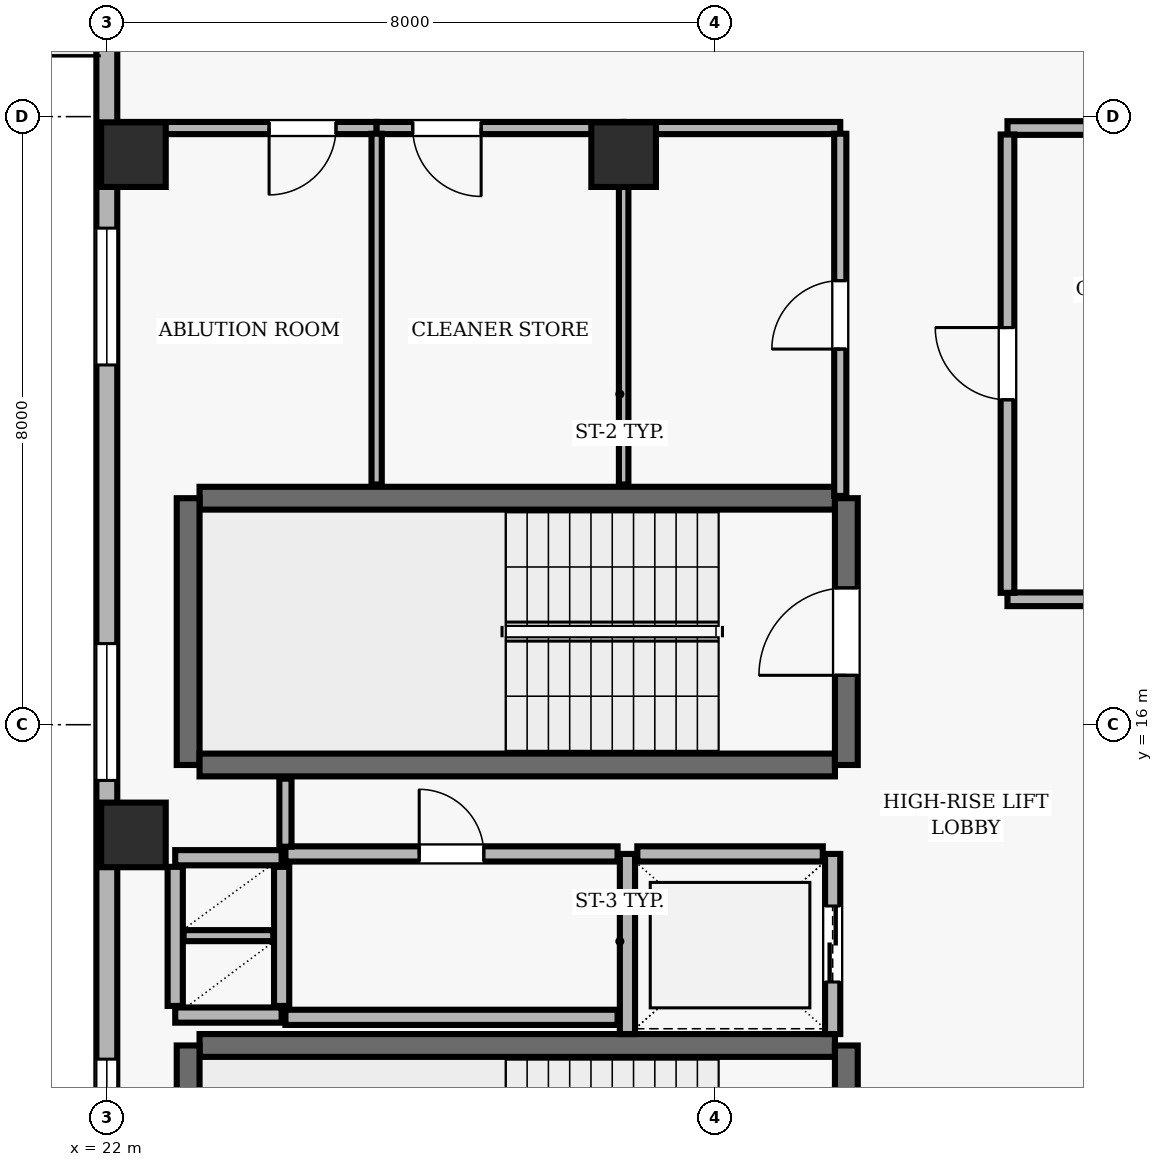
"""IFC4 building model, lengths in metres.
Left out: names, types, materials, properties, quantities, classifications, styles, units other than length and angle.
Written with IfcOpenShell. Run it as: python <this file> out.ifc"""

import sys

from ifc_helpers import new_model, si_unit, direction, frame, frame_2d, origin, origin_2d, place, context, subcontext, project, spatial, rectangle, extrude, element, fill, save


model = new_model("IFC4")
c1 = context("Model", 3, precision=1e-05, world=origin(), true_north=direction((0.0, 1.0)))
c2 = subcontext(c1, "Body", "Model", "MODEL_VIEW")
j1 = project(units=[si_unit("LENGTHUNIT", "METRE"), si_unit("PLANEANGLEUNIT", "RADIAN")], contexts=[c1])
p1 = place(None, origin())
s1 = spatial("IfcSite", under=j1, at=p1, CompositionType="ELEMENT")
p2 = place(p1, origin())
s2 = spatial("IfcBuilding", under=s1, at=p2, CompositionType="ELEMENT")
p3 = place(p2, frame((0.0, 0.0, 302.8)))
s3 = spatial("IfcBuildingStorey", under=s2, at=p3, CompositionType="ELEMENT", Elevation=302.8)
for number, where, z_axis, x_axis in (
    (1, (22.35, 14.55, 0.0), (0.0, 0.0, 1.0), (1.0, 0.0, 0.0)),
    (2, (22.35, 23.5, 0.0), (0.0, 0.0, 1.0), (1.0, 0.0, 0.0)),
    (3, (28.8, 23.5, 0.0), (0.0, 0.0, 1.0), (1.0, 0.0, 0.0)),
):
    element("IfcColumn", number, at=place(p3, frame(where, z_axis=z_axis, x_axis=x_axis)), inside=s3, PredefinedType="COLUMN", context=c2, shape_type="SweptSolid", body=[
        extrude(rectangle(XDim=0.85, YDim=0.85, at=origin_2d()), origin(), (0.0, 0.0, 1.0), 3.9),
    ])
p4 = place(p3, frame((22.0, 35.3, 0.0), z_axis=(0.0, 0.0, 1.0), x_axis=(0.0, -1.0, 0.0)))
e4 = element("IfcWall", 4, at=p4, inside=s3, PredefinedType="SOLIDWALL", context=c2, shape_type="SweptSolid", body=[
    extrude(rectangle(XDim=32.8, YDim=0.275, at=frame_2d((16.4, 0.0))), origin(), (0.0, 0.0, 1.0), 3.64),
])
p5 = place(p4, frame((7.3, 0.0, 0.0)))
e5 = element("IfcOpeningElement", 5, at=p5, cuts=e4, PredefinedType="OPENING", context=c2, shape_type="SweptSolid", body=[
    extrude(rectangle(XDim=1.0, YDim=2.2, at=frame_2d((0.5, 1.1))), frame((0.0, 0.147, 0.0), z_axis=(0.0, -1.0, 0.0), x_axis=(1.0, 0.0, 0.0)), (0.0, 0.0, 1.0), 0.295),
])
p6 = place(p4, frame((2.283, 0.0, 0.9)))
e6 = element("IfcOpeningElement", 6, at=p6, cuts=e4, PredefinedType="OPENING", context=c2, shape_type="SweptSolid", body=[
    extrude(rectangle(XDim=1.8, YDim=1.6, at=frame_2d((0.9, 0.8))), frame((0.0, 0.147, 0.0), z_axis=(0.0, -1.0, 0.0), x_axis=(1.0, 0.0, 0.0)), (0.0, 0.0, 1.0), 0.295),
])
p7 = place(p4, frame((12.767, 0.0, 0.9)))
e7 = element("IfcOpeningElement", 7, at=p7, cuts=e4, PredefinedType="OPENING", context=c2, shape_type="SweptSolid", body=[
    extrude(rectangle(XDim=1.8, YDim=1.6, at=frame_2d((0.9, 0.8))), frame((0.0, 0.147, 0.0), z_axis=(0.0, -1.0, 0.0), x_axis=(1.0, 0.0, 0.0)), (0.0, 0.0, 1.0), 0.295),
])
p8 = place(p4, frame((18.233, 0.0, 0.9)))
e8 = element("IfcOpeningElement", 8, at=p8, cuts=e4, PredefinedType="OPENING", context=c2, shape_type="SweptSolid", body=[
    extrude(rectangle(XDim=1.8, YDim=1.6, at=frame_2d((0.9, 0.8))), frame((0.0, 0.147, 0.0), z_axis=(0.0, -1.0, 0.0), x_axis=(1.0, 0.0, 0.0)), (0.0, 0.0, 1.0), 0.295),
])
p9 = place(p4, frame((23.7, 0.0, 0.9)))
e9 = element("IfcOpeningElement", 9, at=p9, cuts=e4, PredefinedType="OPENING", context=c2, shape_type="SweptSolid", body=[
    extrude(rectangle(XDim=1.8, YDim=1.6, at=frame_2d((0.9, 0.8))), frame((0.0, 0.147, 0.0), z_axis=(0.0, -1.0, 0.0), x_axis=(1.0, 0.0, 0.0)), (0.0, 0.0, 1.0), 0.295),
])
p10 = place(p3, frame((31.58, 18.98, 0.0), z_axis=(0.0, 0.0, 1.0), x_axis=(-1.0, 0.0, 0.0)))
e10 = element("IfcWall", 10, at=p10, inside=s3, PredefinedType="SHEAR", context=c2, shape_type="SweptSolid", body=[
    extrude(rectangle(XDim=8.36, YDim=0.3, at=frame_2d((4.18, 0.0))), origin(), (0.0, 0.0, 1.0), 3.64),
])
p11 = place(p3, frame((23.07, 18.98, 0.0), z_axis=(0.0, 0.0, 1.0), x_axis=(0.0, -1.0, 0.0)))
e11 = element("IfcWall", 11, at=p11, inside=s3, PredefinedType="SHEAR", context=c2, shape_type="SweptSolid", body=[
    extrude(rectangle(XDim=3.51, YDim=0.3, at=frame_2d((1.755, 0.0))), origin(), (0.0, 0.0, 1.0), 3.64),
])
p12 = place(p3, frame((23.22, 15.47, 0.0), z_axis=(0.0, 0.0, 1.0), x_axis=(1.0, 0.0, 0.0)))
e12 = element("IfcWall", 12, at=p12, inside=s3, PredefinedType="SHEAR", context=c2, shape_type="SweptSolid", body=[
    extrude(rectangle(XDim=8.36, YDim=0.3, at=frame_2d((4.18, 0.0))), origin(), (0.0, 0.0, 1.0), 3.64),
])
p13 = place(p3, frame((31.73, 15.47, 0.0), z_axis=(0.0, 0.0, 1.0), x_axis=(0.0, 1.0, 0.0)))
e13 = element("IfcWall", 13, at=p13, inside=s3, PredefinedType="SHEAR", context=c2, shape_type="SweptSolid", body=[
    extrude(rectangle(XDim=3.51, YDim=0.3, at=frame_2d((1.755, 0.0))), origin(), (0.0, 0.0, 1.0), 3.64),
])
p14 = place(p13, frame((1.18, 0.0, 0.0)))
e14 = element("IfcOpeningElement", 14, at=p14, cuts=e13, PredefinedType="OPENING", context=c2, shape_type="SweptSolid", body=[
    extrude(rectangle(XDim=1.15, YDim=2.15, at=frame_2d((0.575, 1.075))), frame((0.0, 0.16, 0.0), z_axis=(0.0, -1.0, 0.0), x_axis=(1.0, 0.0, 0.0)), (0.0, 0.0, 1.0), 0.32),
])
p15 = place(p3, frame((31.58, 11.78, 0.0), z_axis=(0.0, 0.0, 1.0), x_axis=(-1.0, 0.0, 0.0)))
e15 = element("IfcWall", 15, at=p15, inside=s3, PredefinedType="SHEAR", context=c2, shape_type="SweptSolid", body=[
    extrude(rectangle(XDim=8.36, YDim=0.3, at=frame_2d((4.18, 0.0))), origin(), (0.0, 0.0, 1.0), 3.64),
])
p16 = place(p3, frame((23.07, 11.78, 0.0), z_axis=(0.0, 0.0, 1.0), x_axis=(0.0, -1.0, 0.0)))
e16 = element("IfcWall", 16, at=p16, inside=s3, PredefinedType="SHEAR", context=c2, shape_type="SweptSolid", body=[
    extrude(rectangle(XDim=3.51, YDim=0.3, at=frame_2d((1.755, 0.0))), origin(), (0.0, 0.0, 1.0), 3.64),
])
p17 = place(p3, frame((31.73, 8.27, 0.0), z_axis=(0.0, 0.0, 1.0), x_axis=(0.0, 1.0, 0.0)))
e17 = element("IfcWall", 17, at=p17, inside=s3, PredefinedType="SHEAR", context=c2, shape_type="SweptSolid", body=[
    extrude(rectangle(XDim=3.51, YDim=0.3, at=frame_2d((1.755, 0.0))), origin(), (0.0, 0.0, 1.0), 3.64),
])
p18 = place(p17, frame((1.18, 0.0, 0.0)))
e18 = element("IfcOpeningElement", 18, at=p18, cuts=e17, PredefinedType="OPENING", context=c2, shape_type="SweptSolid", body=[
    extrude(rectangle(XDim=1.15, YDim=2.15, at=frame_2d((0.575, 1.075))), frame((0.0, 0.16, 0.0), z_axis=(0.0, -1.0, 0.0), x_axis=(1.0, 0.0, 0.0)), (0.0, 0.0, 1.0), 0.32),
])
p19 = place(p3, frame((28.85, 14.3, 0.0), z_axis=(0.0, 0.0, 1.0), x_axis=(0.0, -1.0, 0.0)))
e19 = element("IfcWall", 19, at=p19, inside=s3, PredefinedType="SOLIDWALL", context=c2, shape_type="SweptSolid", body=[
    extrude(rectangle(XDim=2.37, YDim=0.2, at=frame_2d((1.185, 0.0))), origin(), (0.0, 0.0, 1.0), 3.64),
])
p20 = place(p3, frame((31.55, 11.93, 0.0), z_axis=(0.0, 0.0, 1.0), x_axis=(0.0, 1.0, 0.0)))
e20 = element("IfcWall", 20, at=p20, inside=s3, PredefinedType="SOLIDWALL", context=c2, shape_type="SweptSolid", body=[
    extrude(rectangle(XDim=2.37, YDim=0.2, at=frame_2d((1.185, 0.0))), origin(), (0.0, 0.0, 1.0), 3.64),
])
p21 = place(p20, frame((0.685, 0.0, 0.0)))
e21 = element("IfcOpeningElement", 21, at=p21, cuts=e20, PredefinedType="OPENING", context=c2, shape_type="SweptSolid", body=[
    extrude(rectangle(XDim=1.0, YDim=2.1, at=frame_2d((0.5, 1.05))), frame((0.0, 0.11, 0.0), z_axis=(0.0, -1.0, 0.0), x_axis=(1.0, 0.0, 0.0)), (0.0, 0.0, 1.0), 0.22),
])
p22 = place(p3, frame((31.42, 14.3, 0.0), z_axis=(0.0, 0.0, 1.0), x_axis=(-1.0, 0.0, 0.0)))
e22 = element("IfcWall", 22, at=p22, inside=s3, PredefinedType="SOLIDWALL", context=c2, shape_type="SweptSolid", body=[
    extrude(rectangle(XDim=2.44, YDim=0.2, at=frame_2d((1.22, 0.0))), origin(), (0.0, 0.0, 1.0), 3.64),
])
for number, where, z_axis, x_axis in (
    (23, (22.9, 14.25, 0.0), (0.0, 0.0, 1.0), (1.0, 0.0, 0.0)),
    (24, (22.9, 12.18, 0.0), (0.0, 0.0, 1.0), (1.0, 0.0, 0.0)),
):
    element("IfcWall", number, at=place(p3, frame(where, z_axis=z_axis, x_axis=x_axis)), inside=s3, PredefinedType="SOLIDWALL", context=c2, shape_type="SweptSolid", body=[
        extrude(rectangle(XDim=1.4, YDim=0.2, at=frame_2d((0.7, 0.0))), origin(), (0.0, 0.0, 1.0), 3.64),
    ])
for number, where, z_axis, x_axis in (
    (25, (24.3, 12.3, 0.0), (0.0, 0.0, 1.0), (0.0, 1.0, 0.0)),
    (26, (22.9, 12.3, 0.0), (0.0, 0.0, 1.0), (0.0, 1.0, 0.0)),
):
    element("IfcWall", number, at=place(p3, frame(where, z_axis=z_axis, x_axis=x_axis)), inside=s3, PredefinedType="SOLIDWALL", context=c2, shape_type="SweptSolid", body=[
        extrude(rectangle(XDim=1.83, YDim=0.2, at=frame_2d((0.915, 0.0))), origin(), (0.0, 0.0, 1.0), 3.64),
    ])
p23 = place(p3, frame((23.01, 13.225, 0.0), z_axis=(0.0, 0.0, 1.0), x_axis=(1.0, 0.0, 0.0)))
e27 = element("IfcWall", 27, at=p23, inside=s3, PredefinedType="PARTITIONING", context=c2, shape_type="SweptSolid", body=[
    extrude(rectangle(XDim=1.18, YDim=0.145, at=frame_2d((0.59, 0.0))), origin(), (0.0, 0.0, 1.0), 3.64),
])
p24 = place(p3, frame((24.35, 12.15, 0.0), z_axis=(0.0, 0.0, 1.0), x_axis=(1.0, 0.0, 0.0)))
e28 = element("IfcWall", 28, at=p24, inside=s3, PredefinedType="SOLIDWALL", context=c2, shape_type="SweptSolid", body=[
    extrude(rectangle(XDim=4.37, YDim=0.2, at=frame_2d((2.185, 0.0))), origin(), (0.0, 0.0, 1.0), 3.64),
])
p25 = place(p3, frame((24.35, 14.3, 0.0), z_axis=(0.0, 0.0, 1.0), x_axis=(1.0, 0.0, 0.0)))
e29 = element("IfcWall", 29, at=p25, inside=s3, PredefinedType="SOLIDWALL", context=c2, shape_type="SweptSolid", body=[
    extrude(rectangle(XDim=4.37, YDim=0.2, at=frame_2d((2.185, 0.0))), origin(), (0.0, 0.0, 1.0), 3.64),
])
p26 = place(p25, frame((1.76, 0.0, 0.0)))
e30 = element("IfcOpeningElement", 30, at=p26, cuts=e29, PredefinedType="OPENING", context=c2, shape_type="SweptSolid", body=[
    extrude(rectangle(XDim=0.85, YDim=2.1, at=frame_2d((0.425, 1.05))), frame((0.0, 0.11, 0.0), z_axis=(0.0, -1.0, 0.0), x_axis=(1.0, 0.0, 0.0)), (0.0, 0.0, 1.0), 0.22),
])
p27 = place(p3, frame((25.55, 23.85, 0.0), z_axis=(0.0, 0.0, 1.0), x_axis=(-1.0, 0.0, 0.0)))
e31 = element("IfcWall", 31, at=p27, inside=s3, PredefinedType="PARTITIONING", context=c2, shape_type="SweptSolid", body=[
    extrude(rectangle(XDim=3.35, YDim=0.16, at=frame_2d((1.675, 0.0))), origin(), (0.0, 0.0, 1.0), 3.171),
])
p28 = place(p27, frame((0.535, 0.0, 0.0)))
e32 = element("IfcOpeningElement", 32, at=p28, cuts=e31, PredefinedType="OPENING", context=c2, shape_type="SweptSolid", body=[
    extrude(rectangle(XDim=0.88, YDim=2.1, at=frame_2d((0.44, 1.05))), frame((0.0, 0.09, 0.0), z_axis=(0.0, -1.0, 0.0), x_axis=(1.0, 0.0, 0.0)), (0.0, 0.0, 1.0), 0.18),
])
p29 = place(p3, frame((28.8, 23.85, 0.0), z_axis=(0.0, 0.0, 1.0), x_axis=(-1.0, 0.0, 0.0)))
e33 = element("IfcWall", 33, at=p29, inside=s3, PredefinedType="PARTITIONING", context=c2, shape_type="SweptSolid", body=[
    extrude(rectangle(XDim=3.25, YDim=0.16, at=frame_2d((1.625, 0.0))), origin(), (0.0, 0.0, 1.0), 3.171),
])
p30 = place(p29, frame((1.875, 0.0, 0.0)))
e34 = element("IfcOpeningElement", 34, at=p30, cuts=e33, PredefinedType="OPENING", context=c2, shape_type="SweptSolid", body=[
    extrude(rectangle(XDim=0.9, YDim=2.1, at=frame_2d((0.45, 1.05))), frame((0.0, 0.09, 0.0), z_axis=(0.0, -1.0, 0.0), x_axis=(1.0, 0.0, 0.0)), (0.0, 0.0, 1.0), 0.18),
])
p31 = place(p3, frame((31.65, 23.85, 0.0), z_axis=(0.0, 0.0, 1.0), x_axis=(-1.0, 0.0, 0.0)))
e35 = element("IfcWall", 35, at=p31, inside=s3, PredefinedType="PARTITIONING", context=c2, shape_type="SweptSolid", body=[
    extrude(rectangle(XDim=2.85, YDim=0.16, at=frame_2d((1.425, 0.0))), origin(), (0.0, 0.0, 1.0), 3.171),
])
p32 = place(p3, frame((33.85, 17.65, 0.0), z_axis=(0.0, 0.0, 1.0), x_axis=(1.0, 0.0, 0.0)))
e36 = element("IfcWall", 36, at=p32, inside=s3, PredefinedType="PARTITIONING", context=c2, shape_type="SweptSolid", body=[
    extrude(rectangle(XDim=1.3, YDim=0.18, at=frame_2d((0.65, 0.0))), origin(), (0.0, 0.0, 1.0), 3.64),
])
p33 = place(p3, frame((37.85, 23.85, 0.0), z_axis=(0.0, 0.0, 1.0), x_axis=(-1.0, 0.0, 0.0)))
e37 = element("IfcWall", 37, at=p33, inside=s3, PredefinedType="PARTITIONING", context=c2, shape_type="SweptSolid", body=[
    extrude(rectangle(XDim=4.0, YDim=0.18, at=frame_2d((2.0, 0.0))), origin(), (0.0, 0.0, 1.0), 3.171),
])
p34 = place(p3, frame((24.35, 15.29, 0.0), z_axis=(0.0, 0.0, 1.0), x_axis=(0.0, -1.0, 0.0)))
e38 = element("IfcWall", 38, at=p34, inside=s3, PredefinedType="PARTITIONING", context=c2, shape_type="SweptSolid", body=[
    extrude(rectangle(XDim=0.895, YDim=0.16, at=frame_2d((0.448, 0.0))), origin(), (0.0, 0.0, 1.0), 3.64),
])
p35 = place(p3, frame((25.55, 19.16, 0.0), z_axis=(0.0, 0.0, 1.0), x_axis=(0.0, 1.0, 0.0)))
e39 = element("IfcWall", 39, at=p35, inside=s3, PredefinedType="PARTITIONING", context=c2, shape_type="SweptSolid", body=[
    extrude(rectangle(XDim=4.615, YDim=0.135, at=frame_2d((2.308, 0.0))), origin(), (0.0, 0.0, 1.0), 3.64),
])
p36 = place(p3, frame((28.8, 23.775, 0.0), z_axis=(0.0, 0.0, 1.0), x_axis=(0.0, -1.0, 0.0)))
e40 = element("IfcWall", 40, at=p36, inside=s3, PredefinedType="PARTITIONING", context=c2, shape_type="SweptSolid", body=[
    extrude(rectangle(XDim=4.615, YDim=0.125, at=frame_2d((2.308, 0.0))), origin(), (0.0, 0.0, 1.0), 3.64),
])
p37 = place(p3, frame((31.65, 19.01, 0.0), z_axis=(0.0, 0.0, 1.0), x_axis=(0.0, 1.0, 0.0)))
e41 = element("IfcWall", 41, at=p37, inside=s3, PredefinedType="PARTITIONING", context=c2, shape_type="SweptSolid", body=[
    extrude(rectangle(XDim=4.765, YDim=0.16, at=frame_2d((2.382, 0.0))), origin(), (0.0, 0.0, 1.0), 3.64),
])
p38 = place(p37, frame((1.932, 0.0, 0.0)))
e42 = element("IfcOpeningElement", 42, at=p38, cuts=e41, PredefinedType="OPENING", context=c2, shape_type="SweptSolid", body=[
    extrude(rectangle(XDim=0.9, YDim=2.1, at=frame_2d((0.45, 1.05))), frame((0.0, 0.09, 0.0), z_axis=(0.0, -1.0, 0.0), x_axis=(1.0, 0.0, 0.0)), (0.0, 0.0, 1.0), 0.18),
])
p39 = place(p3, frame((33.85, 17.735, 0.0), z_axis=(0.0, 0.0, 1.0), x_axis=(0.0, 1.0, 0.0)))
e43 = element("IfcWall", 43, at=p39, inside=s3, PredefinedType="PARTITIONING", context=c2, shape_type="SweptSolid", body=[
    extrude(rectangle(XDim=6.03, YDim=0.18, at=frame_2d((3.015, 0.0))), origin(), (0.0, 0.0, 1.0), 3.64),
])
p40 = place(p39, frame((2.54, 0.0, 0.0)))
e44 = element("IfcOpeningElement", 44, at=p40, cuts=e43, PredefinedType="OPENING", context=c2, shape_type="SweptSolid", body=[
    extrude(rectangle(XDim=0.95, YDim=2.1, at=frame_2d((0.475, 1.05))), frame((0.0, 0.1, 0.0), z_axis=(0.0, -1.0, 0.0), x_axis=(1.0, 0.0, 0.0)), (0.0, 0.0, 1.0), 0.2),
])
p41 = place(p7, origin())
e45 = element("IfcWindow", 45, at=p41, inside=s3, PartitioningType="SINGLE_PANEL", PredefinedType="WINDOW", context=c2, shape_type="SweptSolid", body=[
    extrude(rectangle(XDim=1.8, YDim=1.6, at=frame_2d((0.9, 0.8))), frame((0.0, 0.03, 0.0), z_axis=(0.0, -1.0, 0.0), x_axis=(1.0, 0.0, 0.0)), (0.0, 0.0, 1.0), 0.06),
])
fill(e7, e45)
p42 = place(p8, origin())
e46 = element("IfcWindow", 46, at=p42, inside=s3, PartitioningType="SINGLE_PANEL", PredefinedType="WINDOW", context=c2, shape_type="SweptSolid", body=[
    extrude(rectangle(XDim=1.8, YDim=1.6, at=frame_2d((0.9, 0.8))), frame((0.0, 0.03, 0.0), z_axis=(0.0, -1.0, 0.0), x_axis=(1.0, 0.0, 0.0)), (0.0, 0.0, 1.0), 0.06),
])
fill(e8, e46)
p43 = place(p9, origin())
e47 = element("IfcWindow", 47, at=p43, inside=s3, PartitioningType="SINGLE_PANEL", PredefinedType="WINDOW", context=c2, shape_type="SweptSolid", body=[
    extrude(rectangle(XDim=1.8, YDim=1.6, at=frame_2d((0.9, 0.8))), frame((0.0, 0.03, 0.0), z_axis=(0.0, -1.0, 0.0), x_axis=(1.0, 0.0, 0.0)), (0.0, 0.0, 1.0), 0.06),
])
fill(e9, e47)
p44 = place(p14, origin())
e48 = element("IfcDoor", 48, at=p44, inside=s3, OperationType="SINGLE_SWING_LEFT", PredefinedType="DOOR", context=c2, shape_type="SweptSolid", body=[
    extrude(rectangle(XDim=1.15, YDim=2.15, at=frame_2d((0.575, 1.075))), frame((0.0, 0.025, 0.0), z_axis=(0.0, -1.0, 0.0), x_axis=(1.0, 0.0, 0.0)), (0.0, 0.0, 1.0), 0.05),
])
fill(e14, e48)
p45 = place(p21, origin())
e49 = element("IfcDoor", 49, at=p45, inside=s3, OperationType="DOUBLE_DOOR_SLIDING", PredefinedType="DOOR", context=c2, shape_type="SweptSolid", body=[
    extrude(rectangle(XDim=1.0, YDim=2.1, at=frame_2d((0.5, 1.05))), frame((0.0, 0.025, 0.0), z_axis=(0.0, -1.0, 0.0), x_axis=(1.0, 0.0, 0.0)), (0.0, 0.0, 1.0), 0.05),
])
fill(e21, e49)
p46 = place(p40, origin())
e50 = element("IfcDoor", 50, at=p46, inside=s3, OperationType="SINGLE_SWING_RIGHT", PredefinedType="DOOR", context=c2, shape_type="SweptSolid", body=[
    extrude(rectangle(XDim=0.95, YDim=2.1, at=frame_2d((0.475, 1.05))), frame((0.0, 0.025, 0.0), z_axis=(0.0, -1.0, 0.0), x_axis=(1.0, 0.0, 0.0)), (0.0, 0.0, 1.0), 0.05),
])
fill(e44, e50)
p47 = place(p38, origin())
e51 = element("IfcDoor", 51, at=p47, inside=s3, OperationType="SINGLE_SWING_LEFT", PredefinedType="DOOR", context=c2, shape_type="SweptSolid", body=[
    extrude(rectangle(XDim=0.9, YDim=2.1, at=frame_2d((0.45, 1.05))), frame((0.0, 0.025, 0.0), z_axis=(0.0, -1.0, 0.0), x_axis=(1.0, 0.0, 0.0)), (0.0, 0.0, 1.0), 0.05),
])
fill(e42, e51)
p48 = place(p26, origin())
e52 = element("IfcDoor", 52, at=p48, inside=s3, OperationType="SINGLE_SWING_LEFT", PredefinedType="DOOR", context=c2, shape_type="SweptSolid", body=[
    extrude(rectangle(XDim=0.85, YDim=2.1, at=frame_2d((0.425, 1.05))), frame((0.0, 0.025, 0.0), z_axis=(0.0, -1.0, 0.0), x_axis=(1.0, 0.0, 0.0)), (0.0, 0.0, 1.0), 0.05),
])
fill(e30, e52)
p49 = place(p28, origin())
e53 = element("IfcDoor", 53, at=p49, inside=s3, OperationType="SINGLE_SWING_RIGHT", PredefinedType="DOOR", context=c2, shape_type="SweptSolid", body=[
    extrude(rectangle(XDim=0.88, YDim=2.1, at=frame_2d((0.44, 1.05))), frame((0.0, 0.025, 0.0), z_axis=(0.0, -1.0, 0.0), x_axis=(1.0, 0.0, 0.0)), (0.0, 0.0, 1.0), 0.05),
])
fill(e32, e53)
p50 = place(p30, origin())
e54 = element("IfcDoor", 54, at=p50, inside=s3, OperationType="SINGLE_SWING_LEFT", PredefinedType="DOOR", context=c2, shape_type="SweptSolid", body=[
    extrude(rectangle(XDim=0.9, YDim=2.1, at=frame_2d((0.45, 1.05))), frame((0.0, 0.025, 0.0), z_axis=(0.0, -1.0, 0.0), x_axis=(1.0, 0.0, 0.0)), (0.0, 0.0, 1.0), 0.05),
])
fill(e34, e54)
save(model, sys.argv[1])
